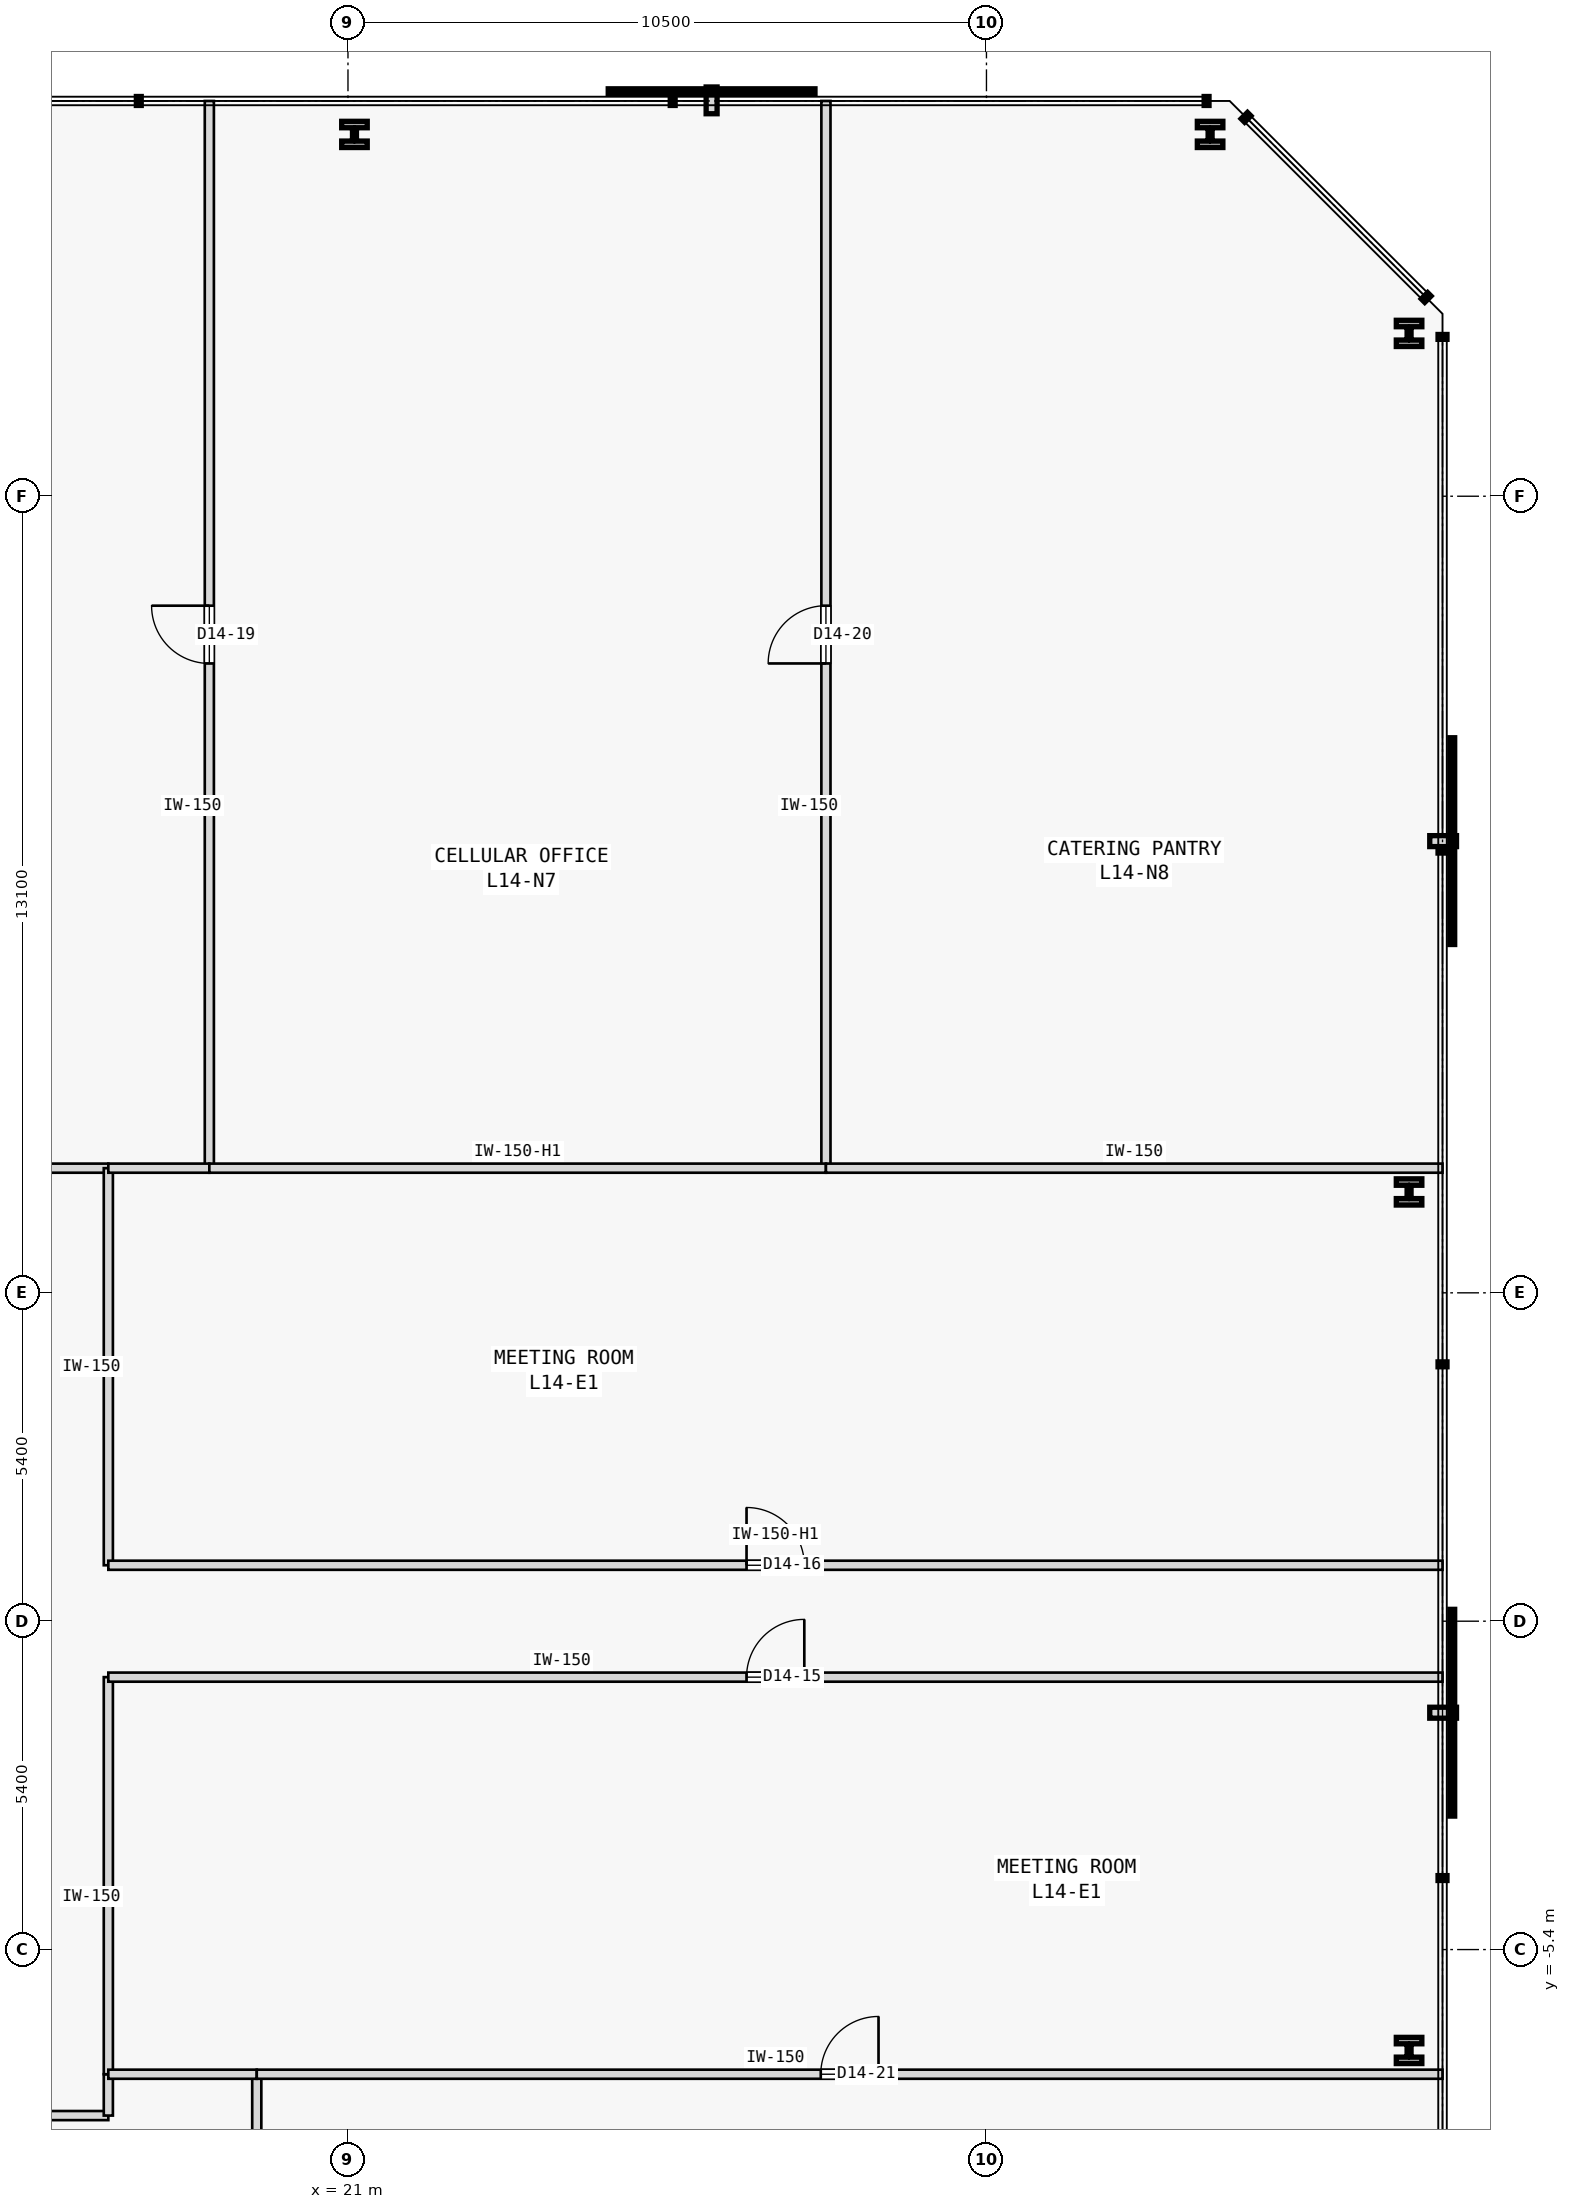
"""IFC4 building model, lengths in metres.
Left out: names, types, materials, properties, quantities, classifications, styles, units other than length and angle.
Written with IfcOpenShell. Run it as: python <this file> out.ifc"""

import sys

from ifc_helpers import new_model, si_unit, direction, frame, frame_2d, origin, origin_2d, place, context, subcontext, project, spatial, rectangle, i_section, extrude, element, fill, save


model = new_model("IFC4")
c1 = context("Model", 3, precision=1e-05, world=origin(), true_north=direction((0.0, 1.0)))
c2 = subcontext(c1, "Body", "Model", "MODEL_VIEW")
j1 = project(units=[si_unit("LENGTHUNIT", "METRE"), si_unit("PLANEANGLEUNIT", "RADIAN")], contexts=[c1])
p1 = place(None, origin())
s1 = spatial("IfcSite", under=j1, at=p1, CompositionType="ELEMENT")
p2 = place(p1, origin())
s2 = spatial("IfcBuilding", under=s1, at=p2, CompositionType="ELEMENT")
p3 = place(p2, frame((0.0, 0.0, 59.8)))
s3 = spatial("IfcBuildingStorey", under=s2, at=p3, CompositionType="ELEMENT", Elevation=59.8)
for number, where, z_axis, x_axis in (
    (1, (38.45, -7.059, 0.0), (0.0, 0.0, 1.0), (1.0, 0.0, 0.0)),
    (2, (38.45, 7.059, 0.0), (0.0, 0.0, 1.0), (1.0, 0.0, 0.0)),
    (3, (38.45, 21.178, 0.0), (0.0, 0.0, 1.0), (1.0, 0.0, 0.0)),
    (4, (35.178, 24.45, 0.0), (0.0, 0.0, 1.0), (1.0, 0.0, 0.0)),
    (5, (21.107, 24.45, 0.0), (0.0, 0.0, 1.0), (1.0, 0.0, 0.0)),
):
    element("IfcColumn", number, at=place(p3, frame(where, z_axis=z_axis, x_axis=x_axis)), inside=s3, PredefinedType="COLUMN", context=c2, shape_type="SweptSolid", body=[
        extrude(i_section(OverallWidth=0.42, OverallDepth=0.431, WebThickness=0.065, FlangeThickness=0.106, FilletRadius=0.015, at=origin_2d()), origin(), (0.0, 0.0, 1.0), 3.8),
    ])
p4 = place(p3, frame((8.58, 7.45, 0.0), z_axis=(0.0, 0.0, 1.0), x_axis=(1.0, 0.0, 0.0)))
e6 = element("IfcWall", 6, at=p4, inside=s3, PredefinedType="PARTITIONING", context=c2, shape_type="SweptSolid", body=[
    extrude(rectangle(XDim=8.479, YDim=0.15, at=frame_2d((4.24, 0.0))), origin(), (0.0, 0.0, 1.0), 3.575),
])
p5 = place(p4, frame((3.764, 0.0, 0.0)))
e7 = element("IfcOpeningElement", 7, at=p5, cuts=e6, PredefinedType="OPENING", context=c2, shape_type="SweptSolid", body=[
    extrude(rectangle(XDim=0.95, YDim=2.15, at=frame_2d((0.475, 1.075))), frame((0.0, 0.085, 0.0), z_axis=(0.0, -1.0, 0.0), x_axis=(1.0, 0.0, 0.0)), (0.0, 0.0, 1.0), 0.17),
])
p6 = place(p3, frame((0.92, -8.13, 0.0), z_axis=(0.0, 0.0, 1.0), x_axis=(1.0, 0.0, 0.0)))
e8 = element("IfcWall", 8, at=p6, inside=s3, PredefinedType="PARTITIONING", context=c2, shape_type="SweptSolid", body=[
    extrude(rectangle(XDim=16.139, YDim=0.15, at=frame_2d((8.07, 0.0))), origin(), (0.0, 0.0, 1.0), 3.575),
])
p7 = place(p3, frame((17.059, -8.13, 0.0), z_axis=(0.0, 0.0, 1.0), x_axis=(0.0, 1.0, 0.0)))
e9 = element("IfcWall", 9, at=p7, inside=s3, PredefinedType="PARTITIONING", context=c2, shape_type="SweptSolid", body=[
    extrude(rectangle(XDim=0.68, YDim=0.15, at=frame_2d((0.34, 0.0))), origin(), (0.0, 0.0, 1.0), 3.575),
])
p8 = place(p3, frame((17.059, -7.45, 0.0), z_axis=(0.0, 0.0, 1.0), x_axis=(0.0, 1.0, 0.0)))
e10 = element("IfcWall", 10, at=p8, inside=s3, PredefinedType="PARTITIONING", context=c2, shape_type="SweptSolid", body=[
    extrude(rectangle(XDim=6.53, YDim=0.15, at=frame_2d((3.265, 0.0))), origin(), (0.0, 0.0, 1.0), 3.575),
])
p9 = place(p3, frame((17.059, -0.92, 0.0), z_axis=(0.0, 0.0, 1.0), x_axis=(1.0, 0.0, 0.0)))
e11 = element("IfcWall", 11, at=p9, inside=s3, PredefinedType="PARTITIONING", context=c2, shape_type="SweptSolid", body=[
    extrude(rectangle(XDim=21.941, YDim=0.15, at=frame_2d((10.97, 0.0))), origin(), (0.0, 0.0, 1.0), 3.575),
])
p10 = place(p9, frame((10.496, 0.0, 0.0)))
e12 = element("IfcOpeningElement", 12, at=p10, cuts=e11, PredefinedType="OPENING", context=c2, shape_type="SweptSolid", body=[
    extrude(rectangle(XDim=0.95, YDim=2.15, at=frame_2d((0.475, 1.075))), frame((0.0, 0.085, 0.0), z_axis=(0.0, -1.0, 0.0), x_axis=(1.0, 0.0, 0.0)), (0.0, 0.0, 1.0), 0.17),
])
p11 = place(p3, frame((17.059, 0.92, 0.0), z_axis=(0.0, 0.0, 1.0), x_axis=(0.0, 1.0, 0.0)))
e13 = element("IfcWall", 13, at=p11, inside=s3, PredefinedType="PARTITIONING", context=c2, shape_type="SweptSolid", body=[
    extrude(rectangle(XDim=6.53, YDim=0.15, at=frame_2d((3.265, 0.0))), origin(), (0.0, 0.0, 1.0), 3.575),
])
p12 = place(p3, frame((17.059, 0.92, 0.0), z_axis=(0.0, 0.0, 1.0), x_axis=(1.0, 0.0, 0.0)))
e14 = element("IfcWall", 14, at=p12, inside=s3, PredefinedType="PARTITIONING", context=c2, shape_type="SweptSolid", body=[
    extrude(rectangle(XDim=21.941, YDim=0.15, at=frame_2d((10.97, 0.0))), origin(), (0.0, 0.0, 1.0), 3.125),
])
p13 = place(p12, frame((10.496, 0.0, 0.0)))
e15 = element("IfcOpeningElement", 15, at=p13, cuts=e14, PredefinedType="OPENING", context=c2, shape_type="SweptSolid", body=[
    extrude(rectangle(XDim=0.95, YDim=2.15, at=frame_2d((0.475, 1.075))), frame((0.0, 0.085, 0.0), z_axis=(0.0, -1.0, 0.0), x_axis=(1.0, 0.0, 0.0)), (0.0, 0.0, 1.0), 0.17),
])
p14 = place(p3, frame((18.72, 7.45, 0.0), z_axis=(0.0, 0.0, 1.0), x_axis=(0.0, 1.0, 0.0)))
e16 = element("IfcWall", 16, at=p14, inside=s3, PredefinedType="PARTITIONING", context=c2, shape_type="SweptSolid", body=[
    extrude(rectangle(XDim=17.55, YDim=0.15, at=frame_2d((8.775, 0.0))), origin(), (0.0, 0.0, 1.0), 3.575),
])
p15 = place(p14, frame((8.3, 0.0, 0.0)))
e17 = element("IfcOpeningElement", 17, at=p15, cuts=e16, PredefinedType="OPENING", context=c2, shape_type="SweptSolid", body=[
    extrude(rectangle(XDim=0.95, YDim=2.15, at=frame_2d((0.475, 1.075))), frame((0.0, 0.085, 0.0), z_axis=(0.0, -1.0, 0.0), x_axis=(1.0, 0.0, 0.0)), (0.0, 0.0, 1.0), 0.17),
])
p16 = place(p3, frame((17.059, 7.45, 0.0), z_axis=(0.0, 0.0, 1.0), x_axis=(1.0, 0.0, 0.0)))
e18 = element("IfcWall", 18, at=p16, inside=s3, PredefinedType="PARTITIONING", context=c2, shape_type="SweptSolid", body=[
    extrude(rectangle(XDim=1.661, YDim=0.15, at=frame_2d((0.831, 0.0))), origin(), (0.0, 0.0, 1.0), 3.575),
])
p17 = place(p3, frame((28.86, 7.45, 0.0), z_axis=(0.0, 0.0, 1.0), x_axis=(0.0, 1.0, 0.0)))
e19 = element("IfcWall", 19, at=p17, inside=s3, PredefinedType="PARTITIONING", context=c2, shape_type="SweptSolid", body=[
    extrude(rectangle(XDim=17.55, YDim=0.15, at=frame_2d((8.775, 0.0))), origin(), (0.0, 0.0, 1.0), 3.575),
])
p18 = place(p17, frame((8.3, 0.0, 0.0)))
e20 = element("IfcOpeningElement", 20, at=p18, cuts=e19, PredefinedType="OPENING", context=c2, shape_type="SweptSolid", body=[
    extrude(rectangle(XDim=0.95, YDim=2.15, at=frame_2d((0.475, 1.075))), frame((0.0, 0.085, 0.0), z_axis=(0.0, -1.0, 0.0), x_axis=(1.0, 0.0, 0.0)), (0.0, 0.0, 1.0), 0.17),
])
p19 = place(p3, frame((18.72, 7.45, 0.0), z_axis=(0.0, 0.0, 1.0), x_axis=(1.0, 0.0, 0.0)))
e21 = element("IfcWall", 21, at=p19, inside=s3, PredefinedType="PARTITIONING", context=c2, shape_type="SweptSolid", body=[
    extrude(rectangle(XDim=10.14, YDim=0.15, at=frame_2d((5.07, 0.0))), origin(), (0.0, 0.0, 1.0), 3.125),
])
p20 = place(p3, frame((28.86, 7.45, 0.0), z_axis=(0.0, 0.0, 1.0), x_axis=(1.0, 0.0, 0.0)))
e22 = element("IfcWall", 22, at=p20, inside=s3, PredefinedType="PARTITIONING", context=c2, shape_type="SweptSolid", body=[
    extrude(rectangle(XDim=10.14, YDim=0.15, at=frame_2d((5.07, 0.0))), origin(), (0.0, 0.0, 1.0), 3.575),
])
p21 = place(p3, frame((19.5, -25.0, 0.0), z_axis=(0.0, 0.0, 1.0), x_axis=(0.0, 1.0, 0.0)))
e23 = element("IfcWall", 23, at=p21, inside=s3, PredefinedType="PARTITIONING", context=c2, shape_type="SweptSolid", body=[
    extrude(rectangle(XDim=17.55, YDim=0.15, at=frame_2d((8.775, 0.0))), origin(), (0.0, 0.0, 1.0), 3.575),
])
p22 = place(p3, frame((17.059, -7.45, 0.0), z_axis=(0.0, 0.0, 1.0), x_axis=(1.0, 0.0, 0.0)))
e24 = element("IfcWall", 24, at=p22, inside=s3, PredefinedType="PARTITIONING", context=c2, shape_type="SweptSolid", body=[
    extrude(rectangle(XDim=2.441, YDim=0.15, at=frame_2d((1.22, 0.0))), origin(), (0.0, 0.0, 1.0), 3.575),
])
p23 = place(p3, frame((19.5, -7.45, 0.0), z_axis=(0.0, 0.0, 1.0), x_axis=(1.0, 0.0, 0.0)))
e25 = element("IfcWall", 25, at=p23, inside=s3, PredefinedType="PARTITIONING", context=c2, shape_type="SweptSolid", body=[
    extrude(rectangle(XDim=19.5, YDim=0.15, at=frame_2d((9.75, 0.0))), origin(), (0.0, 0.0, 1.0), 3.575),
])
p24 = place(p23, frame((9.275, 0.0, 0.0)))
e26 = element("IfcOpeningElement", 26, at=p24, cuts=e25, PredefinedType="OPENING", context=c2, shape_type="SweptSolid", body=[
    extrude(rectangle(XDim=0.95, YDim=2.15, at=frame_2d((0.475, 1.075))), frame((0.0, 0.085, 0.0), z_axis=(0.0, -1.0, 0.0), x_axis=(1.0, 0.0, 0.0)), (0.0, 0.0, 1.0), 0.17),
])
p25 = place(p10, origin())
e27 = element("IfcDoor", 27, at=p25, inside=s3, OperationType="SINGLE_SWING_RIGHT", PredefinedType="DOOR", context=c2, shape_type="SweptSolid", body=[
    extrude(rectangle(XDim=0.95, YDim=2.15, at=frame_2d((0.475, 1.075))), frame((0.0, 0.025, 0.0), z_axis=(0.0, -1.0, 0.0), x_axis=(1.0, 0.0, 0.0)), (0.0, 0.0, 1.0), 0.05),
])
fill(e12, e27)
p26 = place(p13, origin())
e28 = element("IfcDoor", 28, at=p26, inside=s3, OperationType="SINGLE_SWING_LEFT", PredefinedType="DOOR", context=c2, shape_type="SweptSolid", body=[
    extrude(rectangle(XDim=0.95, YDim=2.15, at=frame_2d((0.475, 1.075))), frame((0.0, 0.025, 0.0), z_axis=(0.0, -1.0, 0.0), x_axis=(1.0, 0.0, 0.0)), (0.0, 0.0, 1.0), 0.05),
])
fill(e15, e28)
p27 = place(p15, origin())
e29 = element("IfcDoor", 29, at=p27, inside=s3, OperationType="SINGLE_SWING_RIGHT", PredefinedType="DOOR", context=c2, shape_type="SweptSolid", body=[
    extrude(rectangle(XDim=0.95, YDim=2.15, at=frame_2d((0.475, 1.075))), frame((0.0, 0.025, 0.0), z_axis=(0.0, -1.0, 0.0), x_axis=(1.0, 0.0, 0.0)), (0.0, 0.0, 1.0), 0.05),
])
fill(e17, e29)
p28 = place(p18, origin())
e30 = element("IfcDoor", 30, at=p28, inside=s3, OperationType="SINGLE_SWING_LEFT", PredefinedType="DOOR", context=c2, shape_type="SweptSolid", body=[
    extrude(rectangle(XDim=0.95, YDim=2.15, at=frame_2d((0.475, 1.075))), frame((0.0, 0.025, 0.0), z_axis=(0.0, -1.0, 0.0), x_axis=(1.0, 0.0, 0.0)), (0.0, 0.0, 1.0), 0.05),
])
fill(e20, e30)
p29 = place(p24, origin())
e31 = element("IfcDoor", 31, at=p29, inside=s3, OperationType="SINGLE_SWING_RIGHT", PredefinedType="DOOR", context=c2, shape_type="SweptSolid", body=[
    extrude(rectangle(XDim=0.95, YDim=2.15, at=frame_2d((0.475, 1.075))), frame((0.0, 0.025, 0.0), z_axis=(0.0, -1.0, 0.0), x_axis=(1.0, 0.0, 0.0)), (0.0, 0.0, 1.0), 0.05),
])
fill(e26, e31)
save(model, sys.argv[1])
